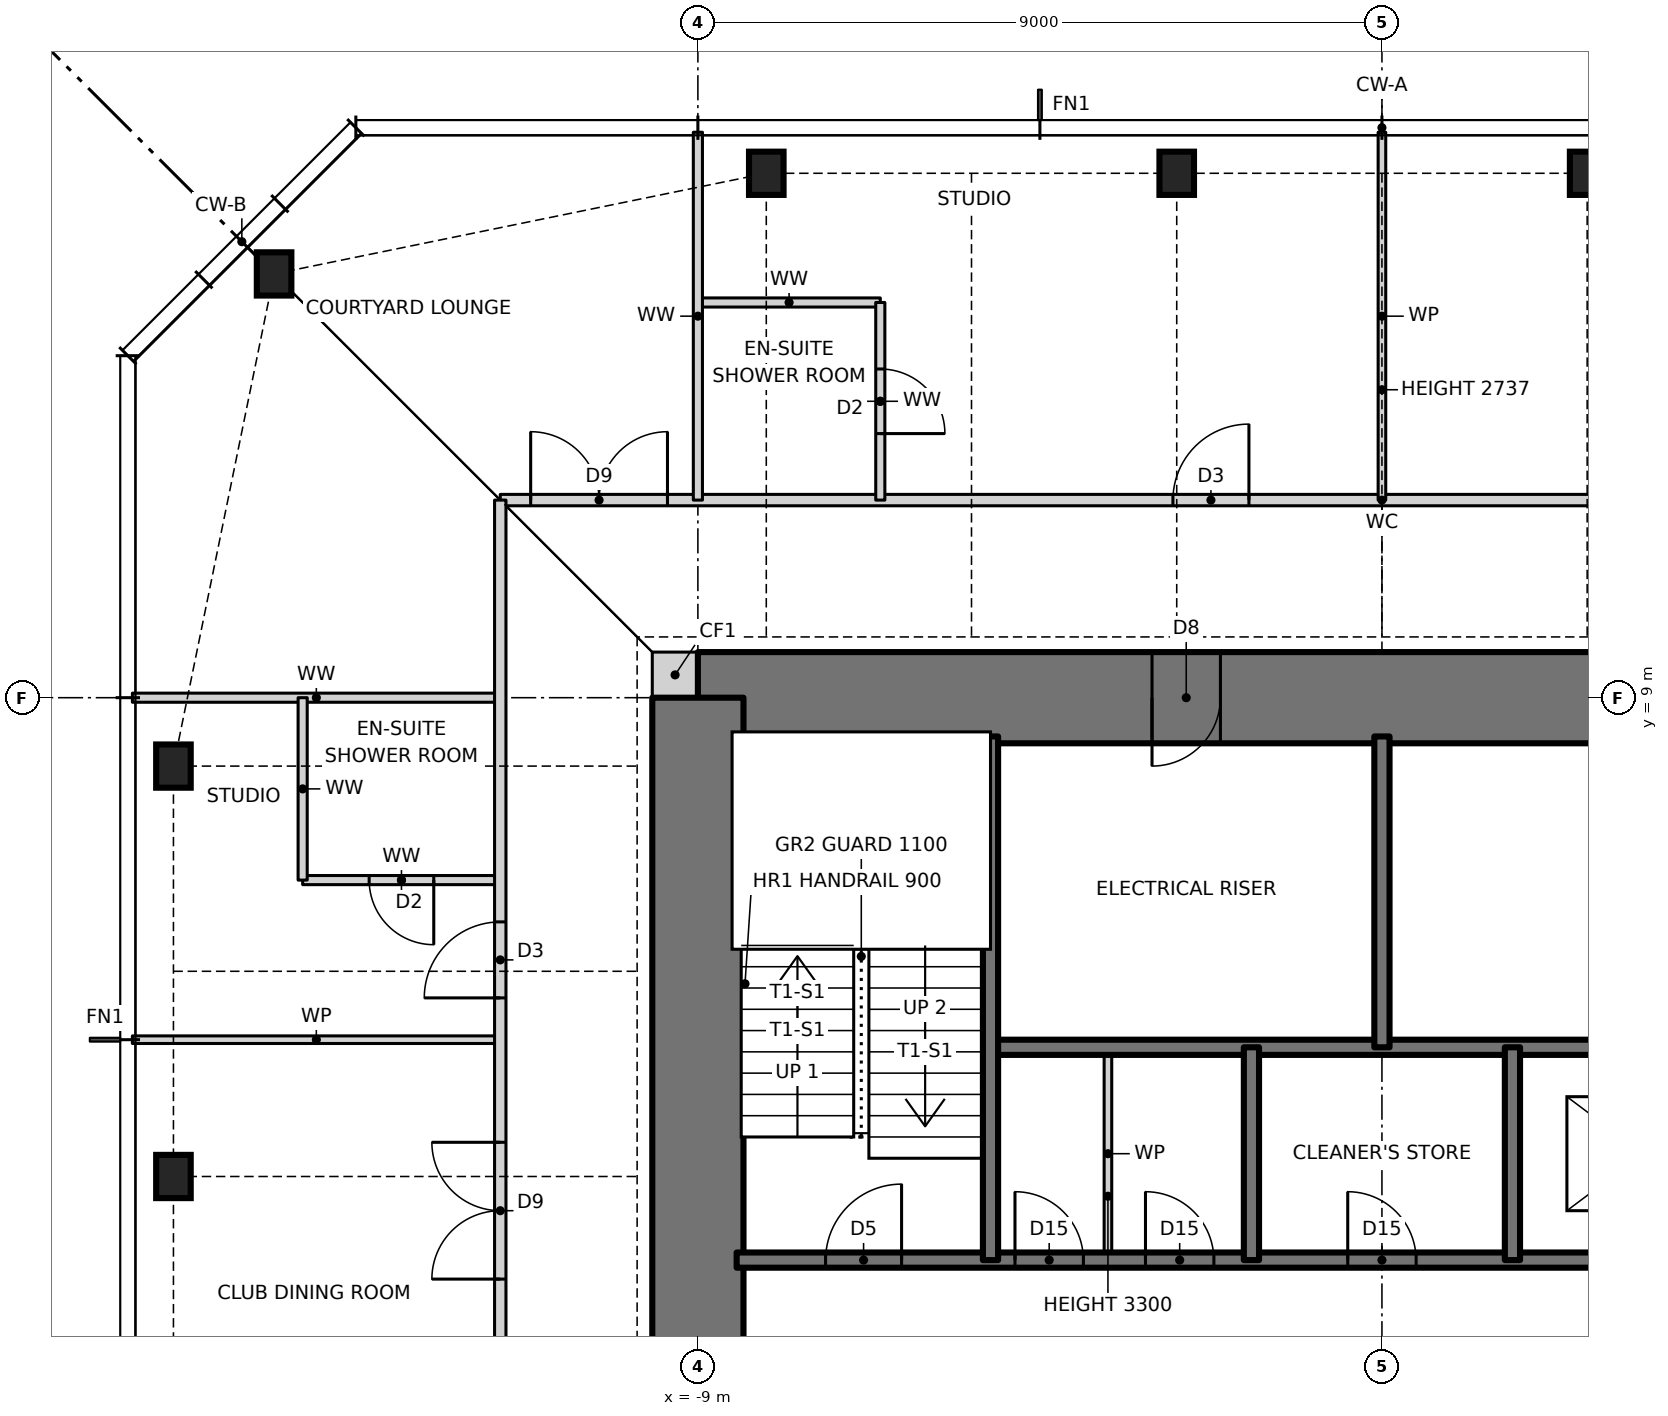
"""IFC4 building model, lengths in metres.
Left out: names, types, materials, properties, quantities, classifications, styles, units other than length and angle.
Written with IfcOpenShell. Run it as: python <this file> out.ifc"""

import sys

from ifc_helpers import new_model, si_unit, direction, frame, frame_2d, origin, origin_2d, place, context, subcontext, project, spatial, rectangle, i_section, extrude, element, fill, save


model = new_model("IFC4")
c1 = context("Model", 3, precision=1e-05, world=origin(), true_north=direction((0.0, 1.0)))
c2 = subcontext(c1, "Body", "Model", "MODEL_VIEW")
j1 = project(units=[si_unit("LENGTHUNIT", "METRE"), si_unit("PLANEANGLEUNIT", "RADIAN")], contexts=[c1])
p1 = place(None, origin())
s1 = spatial("IfcSite", under=j1, at=p1, CompositionType="ELEMENT")
p2 = place(p1, origin())
s2 = spatial("IfcBuilding", under=s1, at=p2, CompositionType="ELEMENT")
p3 = place(p2, frame((0.0, 0.0, 260.5)))
s3 = spatial("IfcBuildingStorey", under=s2, at=p3, CompositionType="ELEMENT", Elevation=260.5)
for number, where, z_axis, x_axis in (
    (1, (2.7, 15.9, 0.0), (0.0, 0.0, 1.0), (1.0, 0.0, 0.0)),
    (2, (-2.7, 15.9, 0.0), (0.0, 0.0, 1.0), (1.0, 0.0, 0.0)),
    (3, (-8.1, 15.9, 0.0), (0.0, 0.0, 1.0), (1.0, 0.0, 0.0)),
    (4, (-14.576, 14.576, 0.0), (0.0, 0.0, 1.0), (1.0, 0.0, 0.0)),
    (5, (-15.9, 8.1, 0.0), (0.0, 0.0, 1.0), (1.0, 0.0, 0.0)),
    (6, (-15.9, 2.7, 0.0), (0.0, 0.0, 1.0), (1.0, 0.0, 0.0)),
):
    element("IfcColumn", number, at=place(p3, frame(where, z_axis=z_axis, x_axis=x_axis)), inside=s3, PredefinedType="COLUMN", context=c2, shape_type="SweptSolid", body=[
        extrude(i_section(OverallWidth=0.455, OverallDepth=0.569, WebThickness=0.078, FlangeThickness=0.125, at=origin_2d()), origin(), (0.0, 0.0, 1.0), 3.5),
    ])
p4 = place(p3, frame((-9.6, 9.3, 0.0), z_axis=(0.0, 0.0, 1.0), x_axis=(1.0, 0.0, 0.0)))
e7 = element("IfcWall", 7, at=p4, inside=s3, PredefinedType="SOLIDWALL", context=c2, shape_type="SweptSolid", body=[
    extrude(rectangle(XDim=0.6, YDim=0.6, at=frame_2d((0.3, 0.0))), origin(), (0.0, 0.0, 1.0), 3.5),
])
p5 = place(p3, frame((9.0, 9.0, 0.0), z_axis=(0.0, 0.0, 1.0), x_axis=(-1.0, 0.0, 0.0)))
e8 = element("IfcWall", 8, at=p5, inside=s3, PredefinedType="SHEAR", context=c2, shape_type="SweptSolid", body=[
    extrude(rectangle(XDim=18.0, YDim=1.2, at=frame_2d((9.0, 0.0))), origin(), (0.0, 0.0, 1.0), 3.5),
])
p6 = place(p5, frame((11.125, 0.0, 0.0)))
e9 = element("IfcOpeningElement", 9, at=p6, cuts=e8, PredefinedType="OPENING", context=c2, shape_type="SweptSolid", body=[
    extrude(rectangle(XDim=0.9, YDim=2.1, at=frame_2d((0.45, 1.05))), frame((0.0, 0.61, 0.0), z_axis=(0.0, -1.0, 0.0), x_axis=(1.0, 0.0, 0.0)), (0.0, 0.0, 1.0), 1.22),
])
p7 = place(p5, frame((4.275, 0.0, 0.0)))
e10 = element("IfcOpeningElement", 10, at=p7, cuts=e8, PredefinedType="OPENING", context=c2, shape_type="SweptSolid", body=[
    extrude(rectangle(XDim=0.9, YDim=2.1, at=frame_2d((0.45, 1.05))), frame((0.0, 0.61, 0.0), z_axis=(0.0, -1.0, 0.0), x_axis=(1.0, 0.0, 0.0)), (0.0, 0.0, 1.0), 1.22),
])
p8 = place(p3, frame((-9.0, 9.0, 0.0), z_axis=(0.0, 0.0, 1.0), x_axis=(0.0, -1.0, 0.0)))
e11 = element("IfcWall", 11, at=p8, inside=s3, PredefinedType="SHEAR", context=c2, shape_type="SweptSolid", body=[
    extrude(rectangle(XDim=18.0, YDim=1.2, at=frame_2d((9.0, 0.0))), origin(), (0.0, 0.0, 1.0), 3.5),
])
p9 = place(p8, frame((8.5, 0.0, 0.0)))
e12 = element("IfcOpeningElement", 12, at=p9, cuts=e11, PredefinedType="OPENING", context=c2, shape_type="SweptSolid", body=[
    extrude(rectangle(XDim=1.0, YDim=2.1, at=frame_2d((0.5, 1.05))), frame((0.0, 0.61, 0.0), z_axis=(0.0, -1.0, 0.0), x_axis=(1.0, 0.0, 0.0)), (0.0, 0.0, 1.0), 1.22),
])
p10 = place(p3, frame((-8.49, 1.6, 0.0), z_axis=(0.0, 0.0, 1.0), x_axis=(1.0, 0.0, 0.0)))
e13 = element("IfcWall", 13, at=p10, inside=s3, PredefinedType="SOLIDWALL", context=c2, shape_type="SweptSolid", body=[
    extrude(rectangle(XDim=16.98, YDim=0.2, at=frame_2d((8.49, 0.0))), origin(), (0.0, 0.0, 1.0), 3.5),
])
p11 = place(p10, frame((1.17, 0.0, 0.0)))
e14 = element("IfcOpeningElement", 14, at=p11, cuts=e13, PredefinedType="OPENING", context=c2, shape_type="SweptSolid", body=[
    extrude(rectangle(XDim=1.0, YDim=2.1, at=frame_2d((0.5, 1.05))), frame((0.0, 0.11, 0.0), z_axis=(0.0, -1.0, 0.0), x_axis=(1.0, 0.0, 0.0)), (0.0, 0.0, 1.0), 0.22),
])
p12 = place(p10, frame((5.379, 0.0, 0.0)))
e15 = element("IfcOpeningElement", 15, at=p12, cuts=e13, PredefinedType="OPENING", context=c2, shape_type="SweptSolid", body=[
    extrude(rectangle(XDim=0.9, YDim=2.1, at=frame_2d((0.45, 1.05))), frame((0.0, 0.11, 0.0), z_axis=(0.0, -1.0, 0.0), x_axis=(1.0, 0.0, 0.0)), (0.0, 0.0, 1.0), 0.22),
])
p13 = place(p10, frame((3.662, 0.0, 0.0)))
e16 = element("IfcOpeningElement", 16, at=p13, cuts=e13, PredefinedType="OPENING", context=c2, shape_type="SweptSolid", body=[
    extrude(rectangle(XDim=0.9, YDim=2.1, at=frame_2d((0.45, 1.05))), frame((0.0, 0.11, 0.0), z_axis=(0.0, -1.0, 0.0), x_axis=(1.0, 0.0, 0.0)), (0.0, 0.0, 1.0), 0.22),
])
p14 = place(p10, frame((8.04, 0.0, 0.0)))
e17 = element("IfcOpeningElement", 17, at=p14, cuts=e13, PredefinedType="OPENING", context=c2, shape_type="SweptSolid", body=[
    extrude(rectangle(XDim=0.9, YDim=2.1, at=frame_2d((0.45, 1.05))), frame((0.0, 0.11, 0.0), z_axis=(0.0, -1.0, 0.0), x_axis=(1.0, 0.0, 0.0)), (0.0, 0.0, 1.0), 0.22),
])
p15 = place(p10, frame((11.374, 0.0, 0.0)))
e18 = element("IfcOpeningElement", 18, at=p15, cuts=e13, PredefinedType="OPENING", context=c2, shape_type="SweptSolid", body=[
    extrude(rectangle(XDim=1.1, YDim=2.1, at=frame_2d((0.55, 1.05))), frame((0.0, 0.11, 0.0), z_axis=(0.0, -1.0, 0.0), x_axis=(1.0, 0.0, 0.0)), (0.0, 0.0, 1.0), 0.22),
])
p16 = place(p10, frame((14.66, 0.0, 0.0)))
e19 = element("IfcOpeningElement", 19, at=p16, cuts=e13, PredefinedType="OPENING", context=c2, shape_type="SweptSolid", body=[
    extrude(rectangle(XDim=1.3, YDim=2.1, at=frame_2d((0.65, 1.05))), frame((0.0, 0.11, 0.0), z_axis=(0.0, -1.0, 0.0), x_axis=(1.0, 0.0, 0.0)), (0.0, 0.0, 1.0), 0.22),
])
p17 = place(p3, frame((-5.15, 4.4, 0.0), z_axis=(0.0, 0.0, 1.0), x_axis=(1.0, 0.0, 0.0)))
e20 = element("IfcWall", 20, at=p17, inside=s3, PredefinedType="SOLIDWALL", context=c2, shape_type="SweptSolid", body=[
    extrude(rectangle(XDim=10.3, YDim=0.2, at=frame_2d((5.15, 0.0))), origin(), (0.0, 0.0, 1.0), 3.5),
])
p18 = place(p3, frame((-16.44, 4.5, 0.0), z_axis=(0.0, 0.0, 1.0), x_axis=(1.0, 0.0, 0.0)))
e21 = element("IfcWall", 21, at=p18, inside=s3, PredefinedType="PARTITIONING", context=c2, shape_type="SweptSolid", body=[
    extrude(rectangle(XDim=4.84, YDim=0.1, at=frame_2d((2.42, 0.0))), origin(), (0.0, 0.0, 1.0), 3.27),
])
p19 = place(p3, frame((-14.2, 6.6, 0.0), z_axis=(0.0, 0.0, 1.0), x_axis=(1.0, 0.0, 0.0)))
e22 = element("IfcWall", 22, at=p19, inside=s3, PredefinedType="PARTITIONING", context=c2, shape_type="SweptSolid", body=[
    extrude(rectangle(XDim=2.6, YDim=0.12, at=frame_2d((1.3, 0.0))), origin(), (0.0, 0.0, 1.0), 3.27),
])
p20 = place(p19, frame((0.875, 0.0, 0.0)))
e23 = element("IfcOpeningElement", 23, at=p20, cuts=e22, PredefinedType="OPENING", context=c2, shape_type="SweptSolid", body=[
    extrude(rectangle(XDim=0.85, YDim=2.1, at=frame_2d((0.425, 1.05))), frame((0.0, 0.07, 0.0), z_axis=(0.0, -1.0, 0.0), x_axis=(1.0, 0.0, 0.0)), (0.0, 0.0, 1.0), 0.14),
])
p21 = place(p3, frame((-16.44, 9.0, 0.0), z_axis=(0.0, 0.0, 1.0), x_axis=(1.0, 0.0, 0.0)))
e24 = element("IfcWall", 24, at=p21, inside=s3, PredefinedType="PARTITIONING", context=c2, shape_type="SweptSolid", body=[
    extrude(rectangle(XDim=4.84, YDim=0.12, at=frame_2d((2.42, 0.0))), origin(), (0.0, 0.0, 1.0), 3.27),
])
p22 = place(p3, frame((-11.6, 11.6, 0.0), z_axis=(0.0, 0.0, 1.0), x_axis=(1.0, 0.0, 0.0)))
e25 = element("IfcWall", 25, at=p22, inside=s3, PredefinedType="PARTITIONING", context=c2, shape_type="SweptSolid", body=[
    extrude(rectangle(XDim=23.2, YDim=0.15, at=frame_2d((11.6, 0.0))), origin(), (0.0, 0.0, 1.0), 3.27),
])
p23 = place(p22, frame((15.2, 0.0, 0.0)))
e26 = element("IfcOpeningElement", 26, at=p23, cuts=e25, PredefinedType="OPENING", context=c2, shape_type="SweptSolid", body=[
    extrude(rectangle(XDim=1.8, YDim=2.1, at=frame_2d((0.9, 1.05))), frame((0.0, 0.085, 0.0), z_axis=(0.0, -1.0, 0.0), x_axis=(1.0, 0.0, 0.0)), (0.0, 0.0, 1.0), 0.17),
])
p24 = place(p22, frame((8.85, 0.0, 0.0)))
e27 = element("IfcOpeningElement", 27, at=p24, cuts=e25, PredefinedType="OPENING", context=c2, shape_type="SweptSolid", body=[
    extrude(rectangle(XDim=1.0, YDim=2.1, at=frame_2d((0.5, 1.05))), frame((0.0, 0.085, 0.0), z_axis=(0.0, -1.0, 0.0), x_axis=(1.0, 0.0, 0.0)), (0.0, 0.0, 1.0), 0.17),
])
p25 = place(p22, frame((0.4, 0.0, 0.0)))
e28 = element("IfcOpeningElement", 28, at=p25, cuts=e25, PredefinedType="OPENING", context=c2, shape_type="SweptSolid", body=[
    extrude(rectangle(XDim=1.8, YDim=2.1, at=frame_2d((0.9, 1.05))), frame((0.0, 0.085, 0.0), z_axis=(0.0, -1.0, 0.0), x_axis=(1.0, 0.0, 0.0)), (0.0, 0.0, 1.0), 0.17),
])
p26 = place(p3, frame((-9.0, 14.2, 0.0), z_axis=(0.0, 0.0, 1.0), x_axis=(1.0, 0.0, 0.0)))
e29 = element("IfcWall", 29, at=p26, inside=s3, PredefinedType="PARTITIONING", context=c2, shape_type="SweptSolid", body=[
    extrude(rectangle(XDim=2.4, YDim=0.12, at=frame_2d((1.2, 0.0))), origin(), (0.0, 0.0, 1.0), 3.27),
])
p27 = place(p3, frame((1.717, 1.6, 0.0), z_axis=(0.0, 0.0, 1.0), x_axis=(0.0, 1.0, 0.0)))
e30 = element("IfcWall", 30, at=p27, inside=s3, PredefinedType="SOLIDWALL", context=c2, shape_type="SweptSolid", body=[
    extrude(rectangle(XDim=2.8, YDim=0.2, at=frame_2d((1.4, 0.0))), origin(), (0.0, 0.0, 1.0), 3.5),
])
p28 = place(p3, frame((0.0, 4.4, 0.0), z_axis=(0.0, 0.0, 1.0), x_axis=(0.0, 1.0, 0.0)))
e31 = element("IfcWall", 31, at=p28, inside=s3, PredefinedType="SOLIDWALL", context=c2, shape_type="SweptSolid", body=[
    extrude(rectangle(XDim=4.09, YDim=0.2, at=frame_2d((2.045, 0.0))), origin(), (0.0, 0.0, 1.0), 3.5),
])
p29 = place(p3, frame((0.0, 11.6, 0.0), z_axis=(0.0, 0.0, 1.0), x_axis=(0.0, 1.0, 0.0)))
e32 = element("IfcWall", 32, at=p29, inside=s3, PredefinedType="PARTITIONING", context=c2, shape_type="SweptSolid", body=[
    extrude(rectangle(XDim=4.84, YDim=0.1, at=frame_2d((2.42, 0.0))), origin(), (0.0, 0.0, 1.0), 2.737),
])
p30 = place(p3, frame((-1.717, 1.6, 0.0), z_axis=(0.0, 0.0, 1.0), x_axis=(0.0, 1.0, 0.0)))
e33 = element("IfcWall", 33, at=p30, inside=s3, PredefinedType="SOLIDWALL", context=c2, shape_type="SweptSolid", body=[
    extrude(rectangle(XDim=2.8, YDim=0.2, at=frame_2d((1.4, 0.0))), origin(), (0.0, 0.0, 1.0), 3.5),
])
p31 = place(p3, frame((-3.605, 1.6, 0.0), z_axis=(0.0, 0.0, 1.0), x_axis=(0.0, 1.0, 0.0)))
e34 = element("IfcWall", 34, at=p31, inside=s3, PredefinedType="PARTITIONING", context=c2, shape_type="SweptSolid", body=[
    extrude(rectangle(XDim=2.8, YDim=0.1, at=frame_2d((1.4, 0.0))), origin(), (0.0, 0.0, 1.0), 3.3),
])
p32 = place(p3, frame((-5.15, 1.6, 0.0), z_axis=(0.0, 0.0, 1.0), x_axis=(0.0, 1.0, 0.0)))
e35 = element("IfcWall", 35, at=p32, inside=s3, PredefinedType="SOLIDWALL", context=c2, shape_type="SweptSolid", body=[
    extrude(rectangle(XDim=6.89, YDim=0.2, at=frame_2d((3.445, 0.0))), origin(), (0.0, 0.0, 1.0), 3.5),
])
p33 = place(p3, frame((-6.6, 11.6, 0.0), z_axis=(0.0, 0.0, 1.0), x_axis=(0.0, 1.0, 0.0)))
e36 = element("IfcWall", 36, at=p33, inside=s3, PredefinedType="PARTITIONING", context=c2, shape_type="SweptSolid", body=[
    extrude(rectangle(XDim=2.6, YDim=0.12, at=frame_2d((1.3, 0.0))), origin(), (0.0, 0.0, 1.0), 3.27),
])
p34 = place(p33, frame((0.875, 0.0, 0.0)))
e37 = element("IfcOpeningElement", 37, at=p34, cuts=e36, PredefinedType="OPENING", context=c2, shape_type="SweptSolid", body=[
    extrude(rectangle(XDim=0.85, YDim=2.1, at=frame_2d((0.425, 1.05))), frame((0.0, 0.07, 0.0), z_axis=(0.0, -1.0, 0.0), x_axis=(1.0, 0.0, 0.0)), (0.0, 0.0, 1.0), 0.14),
])
p35 = place(p3, frame((-9.0, 11.6, 0.0), z_axis=(0.0, 0.0, 1.0), x_axis=(0.0, 1.0, 0.0)))
e38 = element("IfcWall", 38, at=p35, inside=s3, PredefinedType="PARTITIONING", context=c2, shape_type="SweptSolid", body=[
    extrude(rectangle(XDim=4.84, YDim=0.12, at=frame_2d((2.42, 0.0))), origin(), (0.0, 0.0, 1.0), 3.27),
])
p36 = place(p3, frame((-11.6, -12.1, 0.0), z_axis=(0.0, 0.0, 1.0), x_axis=(0.0, 1.0, 0.0)))
e39 = element("IfcWall", 39, at=p36, inside=s3, PredefinedType="PARTITIONING", context=c2, shape_type="SweptSolid", body=[
    extrude(rectangle(XDim=23.7, YDim=0.15, at=frame_2d((11.85, 0.0))), origin(), (0.0, 0.0, 1.0), 3.27),
])
p37 = place(p36, frame((17.15, 0.0, 0.0)))
e40 = element("IfcOpeningElement", 40, at=p37, cuts=e39, PredefinedType="OPENING", context=c2, shape_type="SweptSolid", body=[
    extrude(rectangle(XDim=1.0, YDim=2.1, at=frame_2d((0.5, 1.05))), frame((0.0, 0.085, 0.0), z_axis=(0.0, -1.0, 0.0), x_axis=(1.0, 0.0, 0.0)), (0.0, 0.0, 1.0), 0.17),
])
p38 = place(p36, frame((13.45, 0.0, 0.0)))
e41 = element("IfcOpeningElement", 41, at=p38, cuts=e39, PredefinedType="OPENING", context=c2, shape_type="SweptSolid", body=[
    extrude(rectangle(XDim=1.8, YDim=2.1, at=frame_2d((0.9, 1.05))), frame((0.0, 0.085, 0.0), z_axis=(0.0, -1.0, 0.0), x_axis=(1.0, 0.0, 0.0)), (0.0, 0.0, 1.0), 0.17),
])
p39 = place(p36, frame((8.15, 0.0, 0.0)))
e42 = element("IfcOpeningElement", 42, at=p39, cuts=e39, PredefinedType="OPENING", context=c2, shape_type="SweptSolid", body=[
    extrude(rectangle(XDim=1.0, YDim=2.1, at=frame_2d((0.5, 1.05))), frame((0.0, 0.085, 0.0), z_axis=(0.0, -1.0, 0.0), x_axis=(1.0, 0.0, 0.0)), (0.0, 0.0, 1.0), 0.17),
])
p40 = place(p36, frame((6.05, 0.0, 0.0)))
e43 = element("IfcOpeningElement", 43, at=p40, cuts=e39, PredefinedType="OPENING", context=c2, shape_type="SweptSolid", body=[
    extrude(rectangle(XDim=1.0, YDim=2.1, at=frame_2d((0.5, 1.05))), frame((0.0, 0.085, 0.0), z_axis=(0.0, -1.0, 0.0), x_axis=(1.0, 0.0, 0.0)), (0.0, 0.0, 1.0), 0.17),
])
p41 = place(p36, frame((0.65, 0.0, 0.0)))
e44 = element("IfcOpeningElement", 44, at=p41, cuts=e39, PredefinedType="OPENING", context=c2, shape_type="SweptSolid", body=[
    extrude(rectangle(XDim=1.8, YDim=2.1, at=frame_2d((0.9, 1.05))), frame((0.0, 0.085, 0.0), z_axis=(0.0, -1.0, 0.0), x_axis=(1.0, 0.0, 0.0)), (0.0, 0.0, 1.0), 0.17),
])
p42 = place(p3, frame((-14.2, 6.6, 0.0), z_axis=(0.0, 0.0, 1.0), x_axis=(0.0, 1.0, 0.0)))
e45 = element("IfcWall", 45, at=p42, inside=s3, PredefinedType="PARTITIONING", context=c2, shape_type="SweptSolid", body=[
    extrude(rectangle(XDim=2.4, YDim=0.12, at=frame_2d((1.2, 0.0))), origin(), (0.0, 0.0, 1.0), 3.27),
])
p43 = place(p11, origin())
e46 = element("IfcDoor", 46, at=p43, inside=s3, OperationType="SINGLE_SWING_RIGHT", PredefinedType="DOOR", context=c2, shape_type="SweptSolid", body=[
    extrude(rectangle(XDim=1.0, YDim=2.1, at=frame_2d((0.5, 1.05))), frame((0.0, 0.025, 0.0), z_axis=(0.0, -1.0, 0.0), x_axis=(1.0, 0.0, 0.0)), (0.0, 0.0, 1.0), 0.05),
])
fill(e14, e46)
p44 = place(p12, origin())
e47 = element("IfcDoor", 47, at=p44, inside=s3, OperationType="SINGLE_SWING_LEFT", PredefinedType="DOOR", context=c2, shape_type="SweptSolid", body=[
    extrude(rectangle(XDim=0.9, YDim=2.1, at=frame_2d((0.45, 1.05))), frame((0.0, 0.025, 0.0), z_axis=(0.0, -1.0, 0.0), x_axis=(1.0, 0.0, 0.0)), (0.0, 0.0, 1.0), 0.05),
])
fill(e15, e47)
p45 = place(p13, origin())
e48 = element("IfcDoor", 48, at=p45, inside=s3, OperationType="SINGLE_SWING_LEFT", PredefinedType="DOOR", context=c2, shape_type="SweptSolid", body=[
    extrude(rectangle(XDim=0.9, YDim=2.1, at=frame_2d((0.45, 1.05))), frame((0.0, 0.025, 0.0), z_axis=(0.0, -1.0, 0.0), x_axis=(1.0, 0.0, 0.0)), (0.0, 0.0, 1.0), 0.05),
])
fill(e16, e48)
p46 = place(p14, origin())
e49 = element("IfcDoor", 49, at=p46, inside=s3, OperationType="SINGLE_SWING_LEFT", PredefinedType="DOOR", context=c2, shape_type="SweptSolid", body=[
    extrude(rectangle(XDim=0.9, YDim=2.1, at=frame_2d((0.45, 1.05))), frame((0.0, 0.025, 0.0), z_axis=(0.0, -1.0, 0.0), x_axis=(1.0, 0.0, 0.0)), (0.0, 0.0, 1.0), 0.05),
])
fill(e17, e49)
p47 = place(p24, origin())
e50 = element("IfcDoor", 50, at=p47, inside=s3, OperationType="SINGLE_SWING_RIGHT", PredefinedType="DOOR", context=c2, shape_type="SweptSolid", body=[
    extrude(rectangle(XDim=1.0, YDim=2.1, at=frame_2d((0.5, 1.05))), frame((0.0, 0.025, 0.0), z_axis=(0.0, -1.0, 0.0), x_axis=(1.0, 0.0, 0.0)), (0.0, 0.0, 1.0), 0.05),
])
fill(e27, e50)
p48 = place(p34, frame((0.85, 0.0, 0.0), z_axis=(0.0, 0.0, 1.0), x_axis=(-1.0, 0.0, 0.0)))
e51 = element("IfcDoor", 51, at=p48, inside=s3, OperationType="SINGLE_SWING_RIGHT", PredefinedType="DOOR", context=c2, shape_type="SweptSolid", body=[
    extrude(rectangle(XDim=0.85, YDim=2.1, at=frame_2d((0.425, 1.05))), frame((0.0, 0.025, 0.0), z_axis=(0.0, -1.0, 0.0), x_axis=(1.0, 0.0, 0.0)), (0.0, 0.0, 1.0), 0.05),
])
fill(e37, e51)
p49 = place(p37, origin())
e52 = element("IfcDoor", 52, at=p49, inside=s3, OperationType="SINGLE_SWING_LEFT", PredefinedType="DOOR", context=c2, shape_type="SweptSolid", body=[
    extrude(rectangle(XDim=1.0, YDim=2.1, at=frame_2d((0.5, 1.05))), frame((0.0, 0.025, 0.0), z_axis=(0.0, -1.0, 0.0), x_axis=(1.0, 0.0, 0.0)), (0.0, 0.0, 1.0), 0.05),
])
fill(e40, e52)
p50 = place(p20, frame((0.85, 0.0, 0.0), z_axis=(0.0, 0.0, 1.0), x_axis=(-1.0, 0.0, 0.0)))
e53 = element("IfcDoor", 53, at=p50, inside=s3, OperationType="SINGLE_SWING_LEFT", PredefinedType="DOOR", context=c2, shape_type="SweptSolid", body=[
    extrude(rectangle(XDim=0.85, YDim=2.1, at=frame_2d((0.425, 1.05))), frame((0.0, 0.025, 0.0), z_axis=(0.0, -1.0, 0.0), x_axis=(1.0, 0.0, 0.0)), (0.0, 0.0, 1.0), 0.05),
])
fill(e23, e53)
p51 = place(p38, origin())
e54 = element("IfcDoor", 54, at=p51, inside=s3, OperationType="DOUBLE_DOOR_SINGLE_SWING", PredefinedType="DOOR", context=c2, shape_type="SweptSolid", body=[
    extrude(rectangle(XDim=1.8, YDim=2.1, at=frame_2d((0.9, 1.05))), frame((0.0, 0.025, 0.0), z_axis=(0.0, -1.0, 0.0), x_axis=(1.0, 0.0, 0.0)), (0.0, 0.0, 1.0), 0.05),
])
fill(e41, e54)
p52 = place(p25, origin())
e55 = element("IfcDoor", 55, at=p52, inside=s3, OperationType="DOUBLE_DOOR_SINGLE_SWING", PredefinedType="DOOR", context=c2, shape_type="SweptSolid", body=[
    extrude(rectangle(XDim=1.8, YDim=2.1, at=frame_2d((0.9, 1.05))), frame((0.0, 0.025, 0.0), z_axis=(0.0, -1.0, 0.0), x_axis=(1.0, 0.0, 0.0)), (0.0, 0.0, 1.0), 0.05),
])
fill(e28, e55)
p53 = place(p6, origin())
e56 = element("IfcDoor", 56, at=p53, inside=s3, OperationType="SINGLE_SWING_RIGHT", PredefinedType="DOOR", context=c2, shape_type="SweptSolid", body=[
    extrude(rectangle(XDim=0.9, YDim=2.1, at=frame_2d((0.45, 1.05))), frame((0.0, 0.025, 0.0), z_axis=(0.0, -1.0, 0.0), x_axis=(1.0, 0.0, 0.0)), (0.0, 0.0, 1.0), 0.05),
])
fill(e9, e56)
save(model, sys.argv[1])
